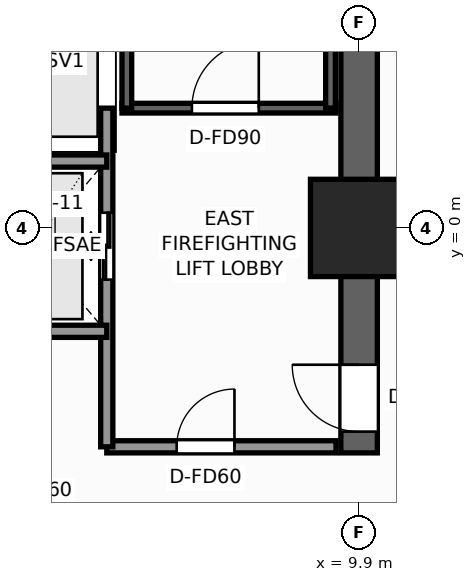
"""IFC4 building model, lengths in metres.
Left out: names, types, materials, properties, quantities, classifications, styles, units other than length and angle.
Written with IfcOpenShell. Run it as: python <this file> out.ifc"""

import sys

from ifc_helpers import new_model, si_unit, direction, frame, frame_2d, origin, origin_2d, place, context, subcontext, project, spatial, rectangle, extrude, element, fill, save


model = new_model("IFC4")
c1 = context("Model", 3, precision=1e-05, world=origin(), true_north=direction((0.0, 1.0)))
c2 = subcontext(c1, "Body", "Model", "MODEL_VIEW")
j1 = project(units=[si_unit("LENGTHUNIT", "METRE"), si_unit("PLANEANGLEUNIT", "RADIAN")], contexts=[c1])
p1 = place(None, origin())
s1 = spatial("IfcSite", under=j1, at=p1, CompositionType="ELEMENT")
p2 = place(p1, origin())
s2 = spatial("IfcBuilding", under=s1, at=p2, CompositionType="ELEMENT")
p3 = place(p2, origin())
s3 = spatial("IfcBuildingStorey", under=s2, at=p3, CompositionType="ELEMENT", Elevation=0.0)
p4 = place(p3, frame((9.9, -3.7, 0.0), z_axis=(0.0, 0.0, 1.0), x_axis=(0.0, 1.0, 0.0)))
e1 = element("IfcWall", 1, at=p4, inside=s3, PredefinedType="SHEAR", context=c2, shape_type="SweptSolid", body=[
    extrude(rectangle(XDim=13.3, YDim=0.6, at=frame_2d((6.65, 0.0))), origin(), (0.0, 0.0, 1.0), 5.5),
])
p5 = place(p4, frame((0.35, 0.0, 0.0)))
e2 = element("IfcOpeningElement", 2, at=p5, cuts=e1, PredefinedType="OPENING", context=c2, shape_type="SweptSolid", body=[
    extrude(rectangle(XDim=1.1, YDim=2.2, at=frame_2d((0.55, 1.1))), frame((0.0, 0.31, 0.0), z_axis=(0.0, -1.0, 0.0), x_axis=(1.0, 0.0, 0.0)), (0.0, 0.0, 1.0), 0.62),
])
p6 = place(p3, frame((9.9, 0.0, 0.0), z_axis=(0.0, 0.0, 1.0), x_axis=(1.0, 0.0, 0.0)))
e3 = element("IfcColumn", 3, at=p6, inside=s3, PredefinedType="COLUMN", context=c2, shape_type="SweptSolid", body=[
    extrude(rectangle(XDim=1.6, YDim=1.6, at=origin_2d()), origin(), (0.0, 0.0, 1.0), 5.5),
])
p7 = place(p3, frame((6.0, 1.97, 0.0), z_axis=(0.0, 0.0, 1.0), x_axis=(1.0, 0.0, 0.0)))
e4 = element("IfcWall", 4, at=p7, inside=s3, PredefinedType="SHEAR", context=c2, shape_type="SweptSolid", body=[
    extrude(rectangle(XDim=3.52, YDim=0.16, at=frame_2d((1.76, 0.0))), origin(), (0.0, 0.0, 1.0), 5.5),
])
p8 = place(p7, frame((1.15, 0.0, 0.0)))
e5 = element("IfcOpeningElement", 5, at=p8, cuts=e4, PredefinedType="OPENING", context=c2, shape_type="SweptSolid", body=[
    extrude(rectangle(XDim=1.1, YDim=2.2, at=frame_2d((0.55, 1.1))), frame((0.0, 0.09, 0.0), z_axis=(0.0, -1.0, 0.0), x_axis=(1.0, 0.0, 0.0)), (0.0, 0.0, 1.0), 0.18),
])
for number, where, z_axis, x_axis in (
    (6, (6.08, 1.97, 0.0), (0.0, 0.0, 1.0), (0.0, 1.0, 0.0)),
    (7, (9.43, 1.97, 0.0), (0.0, 0.0, 1.0), (0.0, 1.0, 0.0)),
):
    element("IfcWall", number, at=place(p3, frame(where, z_axis=z_axis, x_axis=x_axis)), inside=s3, PredefinedType="SHEAR", context=c2, shape_type="SweptSolid", body=[
        extrude(rectangle(XDim=7.56, YDim=0.16, at=frame_2d((3.78, 0.0))), origin(), (0.0, 0.0, 1.0), 5.5),
    ])
p9 = place(p3, frame((5.75, -3.6, 0.0), z_axis=(0.0, 0.0, 1.0), x_axis=(1.0, 0.0, 0.0)))
e8 = element("IfcWall", 8, at=p9, inside=s3, PredefinedType="SOLIDWALL", context=c2, shape_type="SweptSolid", body=[
    extrude(rectangle(XDim=3.77, YDim=0.2, at=frame_2d((1.885, 0.0))), origin(), (0.0, 0.0, 1.0), 5.22),
])
p10 = place(p9, frame((1.15, 0.0, 0.0)))
e9 = element("IfcOpeningElement", 9, at=p10, cuts=e8, PredefinedType="OPENING", context=c2, shape_type="SweptSolid", body=[
    extrude(rectangle(XDim=0.95, YDim=2.06, at=frame_2d((0.475, 1.03))), frame((0.0, 0.11, 0.0), z_axis=(0.0, -1.0, 0.0), x_axis=(1.0, 0.0, 0.0)), (0.0, 0.0, 1.0), 0.22),
])
p11 = place(p3, frame((5.75, -3.6, 0.0), z_axis=(0.0, 0.0, 1.0), x_axis=(0.0, 1.0, 0.0)))
e10 = element("IfcWall", 10, at=p11, inside=s3, PredefinedType="SOLIDWALL", context=c2, shape_type="SweptSolid", body=[
    extrude(rectangle(XDim=5.57, YDim=0.2, at=frame_2d((2.785, 0.0))), origin(), (0.0, 0.0, 1.0), 5.22),
])
p12 = place(p11, frame((2.75, 0.0, 0.0)))
e11 = element("IfcOpeningElement", 11, at=p12, cuts=e10, PredefinedType="OPENING", context=c2, shape_type="SweptSolid", body=[
    extrude(rectangle(XDim=1.1, YDim=2.2, at=frame_2d((0.55, 1.1))), frame((0.0, 0.11, 0.0), z_axis=(0.0, -1.0, 0.0), x_axis=(1.0, 0.0, 0.0)), (0.0, 0.0, 1.0), 0.22),
])
for number, where, z_axis, x_axis in (
    (12, (3.35, -1.7, 0.0), (0.0, 0.0, 1.0), (1.0, 0.0, 0.0)),
    (13, (3.35, 1.1, 0.0), (0.0, 0.0, 1.0), (1.0, 0.0, 0.0)),
):
    element("IfcWall", number, at=place(p3, frame(where, z_axis=z_axis, x_axis=x_axis)), inside=s3, PredefinedType="SOLIDWALL", context=c2, shape_type="SweptSolid", body=[
        extrude(rectangle(XDim=2.4, YDim=0.2, at=frame_2d((1.2, 0.0))), origin(), (0.0, 0.0, 1.0), 5.22),
    ])
p13 = place(p8, origin())
e14 = element("IfcDoor", 14, at=p13, inside=s3, OperationType="SINGLE_SWING_RIGHT", PredefinedType="DOOR", context=c2, shape_type="SweptSolid", body=[
    extrude(rectangle(XDim=1.1, YDim=2.2, at=frame_2d((0.55, 1.1))), frame((0.0, 0.025, 0.0), z_axis=(0.0, -1.0, 0.0), x_axis=(1.0, 0.0, 0.0)), (0.0, 0.0, 1.0), 0.05),
])
fill(e5, e14)
p14 = place(p5, origin())
e15 = element("IfcDoor", 15, at=p14, inside=s3, OperationType="SINGLE_SWING_RIGHT", PredefinedType="DOOR", context=c2, shape_type="SweptSolid", body=[
    extrude(rectangle(XDim=1.1, YDim=2.2, at=frame_2d((0.55, 1.1))), frame((0.0, 0.025, 0.0), z_axis=(0.0, -1.0, 0.0), x_axis=(1.0, 0.0, 0.0)), (0.0, 0.0, 1.0), 0.05),
])
fill(e2, e15)
p15 = place(p12, origin())
e16 = element("IfcDoor", 16, at=p15, inside=s3, OperationType="DOUBLE_DOOR_SLIDING", PredefinedType="DOOR", context=c2, shape_type="SweptSolid", body=[
    extrude(rectangle(XDim=1.1, YDim=2.2, at=frame_2d((0.55, 1.1))), frame((0.0, 0.025, 0.0), z_axis=(0.0, -1.0, 0.0), x_axis=(1.0, 0.0, 0.0)), (0.0, 0.0, 1.0), 0.05),
])
fill(e11, e16)
p16 = place(p10, origin())
e17 = element("IfcDoor", 17, at=p16, inside=s3, OperationType="SINGLE_SWING_RIGHT", PredefinedType="DOOR", context=c2, shape_type="SweptSolid", body=[
    extrude(rectangle(XDim=0.95, YDim=2.06, at=frame_2d((0.475, 1.03))), frame((0.0, 0.025, 0.0), z_axis=(0.0, -1.0, 0.0), x_axis=(1.0, 0.0, 0.0)), (0.0, 0.0, 1.0), 0.05),
])
fill(e9, e17)
save(model, sys.argv[1])
